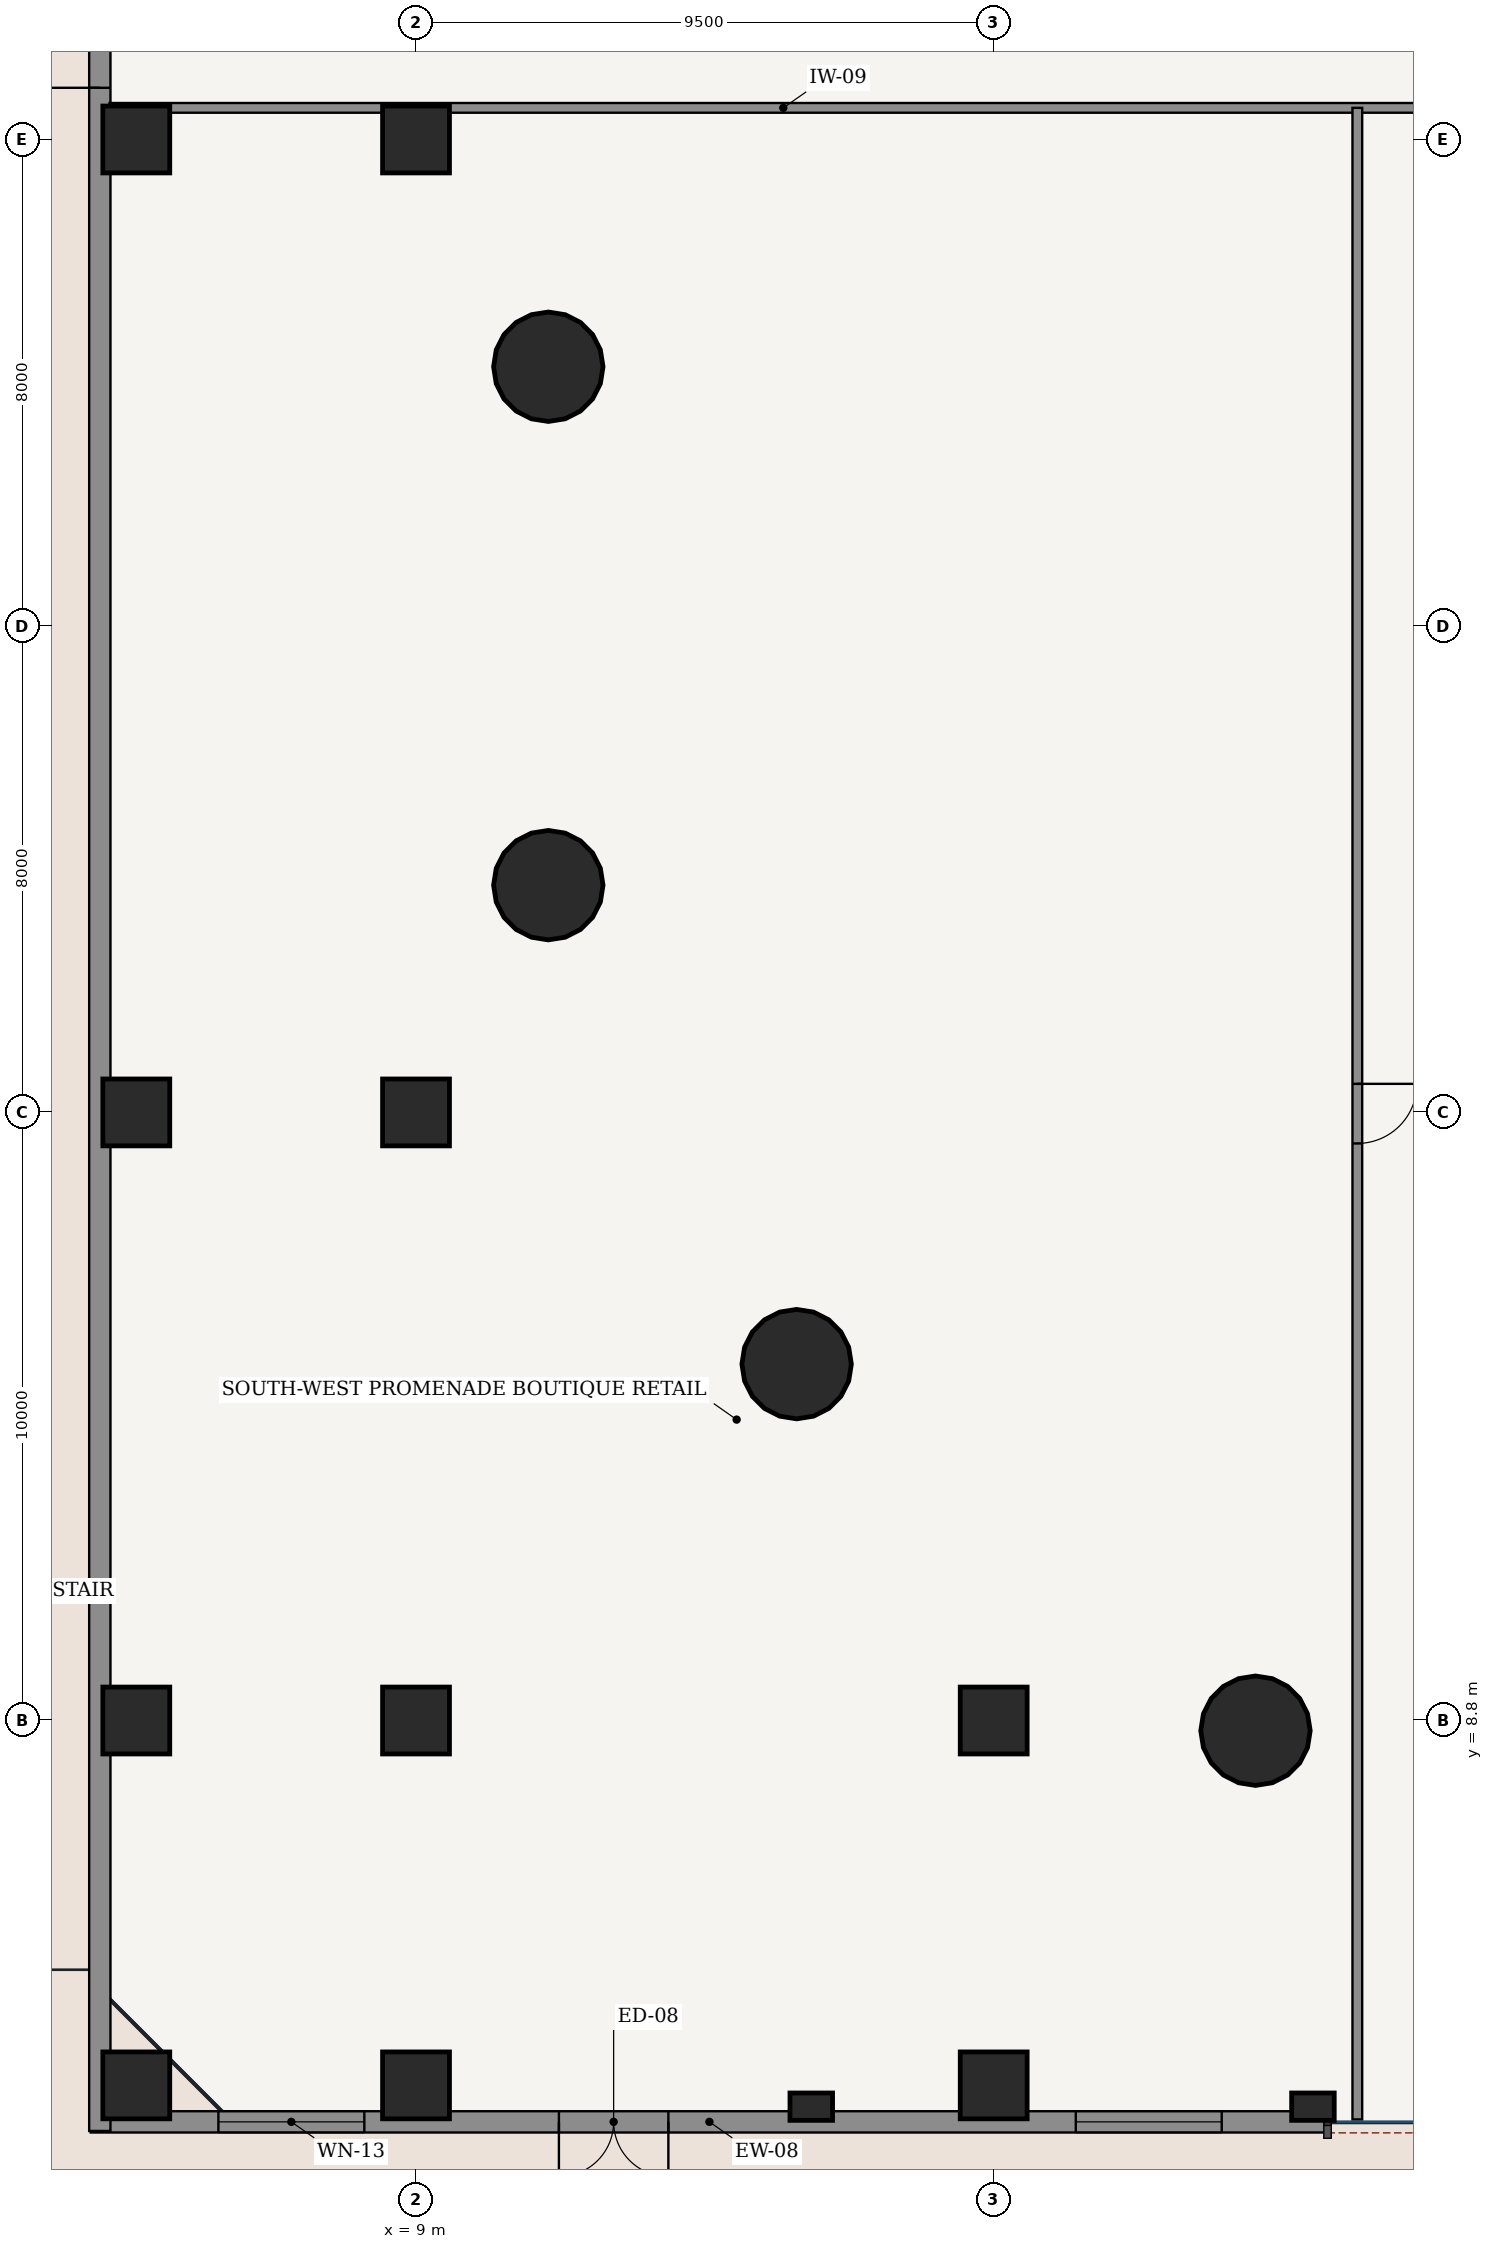
"""IFC4 building model, lengths in metres.
Left out: names, types, materials, properties, quantities, classifications, styles, units other than length and angle.
Written with IfcOpenShell. Run it as: python <this file> out.ifc"""

import sys

from ifc_helpers import new_model, si_unit, direction, frame, frame_2d, origin, origin_2d, place, context, subcontext, project, spatial, rectangle, hollow_circle, extrude, source, transform, mapped, element, fill, save


model = new_model("IFC4")
c1 = context("Model", 3, precision=1e-05, world=origin(), true_north=direction((-0.2419218956, 0.970295726276)))
c2 = subcontext(c1, "Body", "Model", "MODEL_VIEW")
j1 = project(units=[si_unit("LENGTHUNIT", "METRE"), si_unit("PLANEANGLEUNIT", "RADIAN")], contexts=[c1])
p1 = place(None, origin())
s1 = spatial("IfcSite", under=j1, at=p1, CompositionType="ELEMENT")
p2 = place(p1, origin())
s2 = spatial("IfcBuilding", under=s1, at=p2, CompositionType="ELEMENT")
p3 = place(p2, origin())
s3 = spatial("IfcBuildingStorey", under=s2, at=p3, CompositionType="ELEMENT", Elevation=0.0)
for number, where, z_axis, x_axis in (
    (1, (11.176, 31.063, 0.0), (0.0, 0.0, 1.0), (1.0, 0.0, 0.0)),
    (2, (11.176, 22.537, 0.0), (0.0, 0.0, 1.0), (1.0, 0.0, 0.0)),
    (3, (15.259, 14.661, 0.0), (0.0, 0.0, 1.0), (1.0, 0.0, 0.0)),
    (4, (22.805, 8.632, 0.0), (0.0, 0.0, 1.0), (1.0, 0.0, 0.0)),
):
    element("IfcColumn", number, at=place(p3, frame(where, z_axis=z_axis, x_axis=x_axis)), inside=s3, PredefinedType="COLUMN", context=c2, shape_type="SweptSolid", body=[
        extrude(hollow_circle(Radius=0.9, WallThickness=0.055, at=origin_2d()), origin(), (0.0, 0.0, 1.0), 5.4),
    ])
for number, where, z_axis, x_axis in (
    (5, (4.4, 2.8, 0.0), (0.0, 0.0, 1.0), (1.0, 0.0, 0.0)),
    (6, (4.4, 8.8, 0.0), (0.0, 0.0, 1.0), (1.0, 0.0, 0.0)),
    (7, (4.4, 18.8, 0.0), (0.0, 0.0, 1.0), (1.0, 0.0, 0.0)),
    (8, (4.4, 34.8, 0.0), (0.0, 0.0, 1.0), (1.0, 0.0, 0.0)),
    (9, (9.0, 2.8, 0.0), (0.0, 0.0, 1.0), (1.0, 0.0, 0.0)),
    (10, (9.0, 8.8, 0.0), (0.0, 0.0, 1.0), (1.0, 0.0, 0.0)),
    (11, (9.0, 18.8, 0.0), (0.0, 0.0, 1.0), (1.0, 0.0, 0.0)),
    (12, (9.0, 34.8, 0.0), (0.0, 0.0, 1.0), (1.0, 0.0, 0.0)),
    (13, (18.5, 2.8, 0.0), (0.0, 0.0, 1.0), (1.0, 0.0, 0.0)),
    (14, (18.5, 8.8, 0.0), (0.0, 0.0, 1.0), (1.0, 0.0, 0.0)),
):
    element("IfcColumn", number, at=place(p3, frame(where, z_axis=z_axis, x_axis=x_axis)), inside=s3, PredefinedType="COLUMN", context=c2, shape_type="SweptSolid", body=[
        extrude(rectangle(XDim=1.1, YDim=1.1, at=origin_2d()), origin(), (0.0, 0.0, 1.0), 5.4),
    ])
for number, where, z_axis, x_axis in (
    (15, (15.5, 2.45, 0.0), (0.0, 0.0, 1.0), (1.0, 0.0, 0.0)),
    (16, (23.75, 2.45, 0.0), (0.0, 0.0, 1.0), (1.0, 0.0, 0.0)),
):
    element("IfcColumn", number, at=place(p3, frame(where, z_axis=z_axis, x_axis=x_axis)), inside=s3, PredefinedType="PILASTER", context=c2, shape_type="SweptSolid", body=[
        extrude(rectangle(XDim=0.7, YDim=0.45, at=origin_2d()), origin(), (0.0, 0.0, 1.0), 5.4),
    ])
p4 = place(p3, frame((3.65, 2.2, 0.0), z_axis=(0.0, 0.0, 1.0), x_axis=(1.0, 0.0, 0.0)))
e17 = element("IfcWall", 17, at=p4, inside=s3, PredefinedType="SOLIDWALL", context=c2, shape_type="SweptSolid", body=[
    extrude(rectangle(XDim=20.35, YDim=0.35, at=frame_2d((10.175, 0.0))), origin(), (0.0, 0.0, 1.0), 5.1),
])
p5 = place(p4, frame((7.7, 0.0, 0.0)))
e18 = element("IfcOpeningElement", 18, at=p5, cuts=e17, PredefinedType="OPENING", context=c2, shape_type="SweptSolid", body=[
    extrude(rectangle(XDim=1.8, YDim=2.4, at=frame_2d((0.9, 1.2))), frame((0.0, 0.185, 0.0), z_axis=(0.0, -1.0, 0.0), x_axis=(1.0, 0.0, 0.0)), (0.0, 0.0, 1.0), 0.37),
])
p6 = place(p4, frame((2.1, 0.0, 0.85)))
e19 = element("IfcOpeningElement", 19, at=p6, cuts=e17, PredefinedType="OPENING", context=c2, shape_type="SweptSolid", body=[
    extrude(rectangle(XDim=2.4, YDim=2.5, at=frame_2d((1.2, 1.25))), frame((0.0, 0.185, 0.0), z_axis=(0.0, -1.0, 0.0), x_axis=(1.0, 0.0, 0.0)), (0.0, 0.0, 1.0), 0.37),
])
p7 = place(p4, frame((16.2, 0.0, 0.85)))
e20 = element("IfcOpeningElement", 20, at=p7, cuts=e17, PredefinedType="OPENING", context=c2, shape_type="SweptSolid", body=[
    extrude(rectangle(XDim=2.4, YDim=2.5, at=frame_2d((1.2, 1.25))), frame((0.0, 0.185, 0.0), z_axis=(0.0, -1.0, 0.0), x_axis=(1.0, 0.0, 0.0)), (0.0, 0.0, 1.0), 0.37),
])
p8 = place(p3, frame((3.8, 51.55, 0.0), z_axis=(0.0, 0.0, 1.0), x_axis=(0.0, -1.0, 0.0)))
e21 = element("IfcWall", 21, at=p8, inside=s3, PredefinedType="SOLIDWALL", context=c2, shape_type="SweptSolid", body=[
    extrude(rectangle(XDim=49.5, YDim=0.35, at=frame_2d((24.75, 0.0))), origin(), (0.0, 0.0, 1.0), 5.1),
])
p9 = place(p8, frame((13.9, 0.0, 0.0)))
e22 = element("IfcOpeningElement", 22, at=p9, cuts=e21, PredefinedType="OPENING", context=c2, shape_type="SweptSolid", body=[
    extrude(rectangle(XDim=2.0, YDim=2.2, at=frame_2d((1.0, 1.1))), frame((0.0, 0.185, 0.0), z_axis=(0.0, -1.0, 0.0), x_axis=(1.0, 0.0, 0.0)), (0.0, 0.0, 1.0), 0.37),
])
p10 = place(p3, frame((3.96, 35.32, 0.0), z_axis=(0.0, 0.0, 1.0), x_axis=(1.0, 0.0, 0.0)))
e23 = element("IfcWall", 23, at=p10, inside=s3, PredefinedType="PARTITIONING", context=c2, shape_type="SweptSolid", body=[
    extrude(rectangle(XDim=22.16, YDim=0.16, at=frame_2d((11.08, 0.0))), origin(), (0.0, 0.0, 1.0), 4.135),
])
p11 = place(p3, frame((24.48, 2.24, 0.0), z_axis=(0.0, 0.0, 1.0), x_axis=(0.0, 1.0, 0.0)))
e24 = element("IfcWall", 24, at=p11, inside=s3, PredefinedType="PARTITIONING", context=c2, shape_type="SweptSolid", body=[
    extrude(rectangle(XDim=33.08, YDim=0.16, at=frame_2d((16.54, 0.0))), origin(), (0.0, 0.0, 1.0), 4.45),
])
p12 = place(p11, frame((16.05, 0.0, 0.0)))
e25 = element("IfcOpeningElement", 25, at=p12, cuts=e24, PredefinedType="OPENING", context=c2, shape_type="SweptSolid", body=[
    extrude(rectangle(XDim=0.98, YDim=2.2, at=frame_2d((0.49, 1.1))), frame((0.0, 0.09, 0.0), z_axis=(0.0, -1.0, 0.0), x_axis=(1.0, 0.0, 0.0)), (0.0, 0.0, 1.0), 0.18),
])
m1 = source(origin(), c2, "Body", "SweptSolid", [
    extrude(rectangle(XDim=1.8, YDim=2.4, at=frame_2d((0.9, 1.2))), frame((0.0, 0.025, 0.0), z_axis=(0.0, -1.0, 0.0), x_axis=(1.0, 0.0, 0.0)), (0.0, 0.0, 1.0), 0.05),
])
p13 = place(p5, frame((1.8, 0.0, 0.0), z_axis=(0.0, 0.0, 1.0), x_axis=(-1.0, 0.0, 0.0)))
e26 = element("IfcDoor", 26, at=p13, inside=s3, OperationType="DOUBLE_DOOR_SINGLE_SWING", PredefinedType="DOOR", context=c2, shape_type="MappedRepresentation", body=[
    mapped(m1, transform((0.0, 0.0, 0.0), scale=1.0)),
])
fill(e18, e26)
m2 = source(origin(), c2, "Body", "SweptSolid", [
    extrude(rectangle(XDim=2.4, YDim=2.5, at=frame_2d((1.2, 1.25))), frame((0.0, 0.03, 0.0), z_axis=(0.0, -1.0, 0.0), x_axis=(1.0, 0.0, 0.0)), (0.0, 0.0, 1.0), 0.06),
])
p14 = place(p6, origin())
e27 = element("IfcWindow", 27, at=p14, inside=s3, PartitioningType="SINGLE_PANEL", PredefinedType="WINDOW", context=c2, shape_type="MappedRepresentation", body=[
    mapped(m2, transform((0.0, 0.0, 0.0), scale=1.0)),
])
fill(e19, e27)
p15 = place(p7, origin())
e28 = element("IfcWindow", 28, at=p15, inside=s3, PartitioningType="SINGLE_PANEL", PredefinedType="WINDOW", context=c2, shape_type="MappedRepresentation", body=[
    mapped(m2, transform((0.0, 0.0, 0.0), scale=1.0)),
])
fill(e20, e28)
m3 = source(origin(), c2, "Body", "SweptSolid", [
    extrude(rectangle(XDim=2.0, YDim=2.2, at=frame_2d((1.0, 1.1))), frame((0.0, 0.025, 0.0), z_axis=(0.0, -1.0, 0.0), x_axis=(1.0, 0.0, 0.0)), (0.0, 0.0, 1.0), 0.05),
])
p16 = place(p9, frame((2.0, 0.0, 0.0), z_axis=(0.0, 0.0, 1.0), x_axis=(-1.0, 0.0, 0.0)))
e29 = element("IfcDoor", 29, at=p16, inside=s3, OperationType="DOUBLE_DOOR_SINGLE_SWING", PredefinedType="DOOR", context=c2, shape_type="MappedRepresentation", body=[
    mapped(m3, transform((0.0, 0.0, 0.0), scale=1.0)),
])
fill(e22, e29)
m4 = source(origin(), c2, "Body", "SweptSolid", [
    extrude(rectangle(XDim=0.98, YDim=2.2, at=frame_2d((0.49, 1.1))), frame((0.0, 0.025, 0.0), z_axis=(0.0, -1.0, 0.0), x_axis=(1.0, 0.0, 0.0)), (0.0, 0.0, 1.0), 0.05),
])
p17 = place(p12, frame((0.98, 0.0, 0.0), z_axis=(0.0, 0.0, 1.0), x_axis=(-1.0, 0.0, 0.0)))
e30 = element("IfcDoor", 30, at=p17, inside=s3, OperationType="SINGLE_SWING_LEFT", PredefinedType="DOOR", context=c2, shape_type="MappedRepresentation", body=[
    mapped(m4, transform((0.0, 0.0, 0.0), scale=1.0)),
])
fill(e25, e30)
save(model, sys.argv[1])
